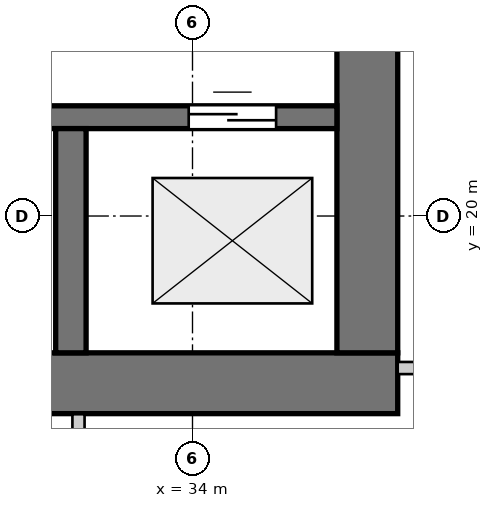
"""IFC4 building model, lengths in metres.
Left out: names, types, materials, properties, quantities, classifications, styles, units other than length and angle.
Written with IfcOpenShell. Run it as: python <this file> out.ifc"""

import sys

from ifc_helpers import new_model, si_unit, direction, frame, frame_2d, origin, place, context, subcontext, project, spatial, rectangle, extrude, source, transform, mapped, element, fill, save


model = new_model("IFC4")
c1 = context("Model", 3, precision=1e-05, world=origin(), true_north=direction((0.0, 1.0)))
c2 = subcontext(c1, "Body", "Model", "MODEL_VIEW")
j1 = project(units=[si_unit("LENGTHUNIT", "METRE"), si_unit("PLANEANGLEUNIT", "RADIAN")], contexts=[c1])
p1 = place(None, origin())
s1 = spatial("IfcSite", under=j1, at=p1, CompositionType="ELEMENT")
p2 = place(p1, origin())
s2 = spatial("IfcBuilding", under=s1, at=p2, CompositionType="ELEMENT")
p3 = place(p2, frame((0.0, 0.0, -8.7)))
s3 = spatial("IfcBuildingStorey", under=s2, at=p3, CompositionType="ELEMENT", Elevation=-8.7)
p4 = place(p3, frame((24.0, 17.8, 0.0), z_axis=(0.0, 0.0, 1.0), x_axis=(1.0, 0.0, 0.0)))
e1 = element("IfcWall", 1, at=p4, inside=s3, PredefinedType="SHEAR", context=c2, shape_type="SweptSolid", body=[
    extrude(rectangle(XDim=12.7, YDim=0.8, at=frame_2d((6.35, 0.0))), origin(), (0.0, 0.0, 1.0), 4.2),
])
p5 = place(p3, frame((36.3, 18.2, 0.0), z_axis=(0.0, 0.0, 1.0), x_axis=(0.0, 1.0, 0.0)))
e2 = element("IfcWall", 2, at=p5, inside=s3, PredefinedType="SHEAR", context=c2, shape_type="SweptSolid", body=[
    extrude(rectangle(XDim=15.6, YDim=0.8, at=frame_2d((7.8, 0.0))), origin(), (0.0, 0.0, 1.0), 4.2),
])
p6 = place(p5, frame((4.25, 0.0, 0.0)))
e3 = element("IfcOpeningElement", 3, at=p6, cuts=e2, PredefinedType="OPENING", context=c2, shape_type="SweptSolid", body=[
    extrude(rectangle(XDim=1.1, YDim=2.15, at=frame_2d((0.55, 1.075))), frame((0.0, 0.41, 0.0), z_axis=(0.0, -1.0, 0.0), x_axis=(1.0, 0.0, 0.0)), (0.0, 0.0, 1.0), 0.82),
])
p7 = place(p5, frame((10.25, 0.0, 0.0)))
e4 = element("IfcOpeningElement", 4, at=p7, cuts=e2, PredefinedType="OPENING", context=c2, shape_type="SweptSolid", body=[
    extrude(rectangle(XDim=1.1, YDim=2.15, at=frame_2d((0.55, 1.075))), frame((0.0, 0.41, 0.0), z_axis=(0.0, -1.0, 0.0), x_axis=(1.0, 0.0, 0.0)), (0.0, 0.0, 1.0), 0.82),
])
p8 = place(p3, frame((24.8, 21.3, 0.0), z_axis=(0.0, 0.0, 1.0), x_axis=(1.0, 0.0, 0.0)))
e5 = element("IfcWall", 5, at=p8, inside=s3, PredefinedType="SHEAR", context=c2, shape_type="SweptSolid", body=[
    extrude(rectangle(XDim=11.1, YDim=0.3, at=frame_2d((5.55, 0.0))), origin(), (0.0, 0.0, 1.0), 4.2),
])
p9 = place(p8, frame((6.22, 0.0, 0.0)))
e6 = element("IfcOpeningElement", 6, at=p9, cuts=e5, PredefinedType="OPENING", context=c2, shape_type="SweptSolid", body=[
    extrude(rectangle(XDim=0.98, YDim=2.15, at=frame_2d((0.49, 1.075))), frame((0.0, 0.16, 0.0), z_axis=(0.0, -1.0, 0.0), x_axis=(1.0, 0.0, 0.0)), (0.0, 0.0, 1.0), 0.32),
])
p10 = place(p8, frame((9.15, 0.0, 0.0)))
e7 = element("IfcOpeningElement", 7, at=p10, cuts=e5, PredefinedType="OPENING", context=c2, shape_type="SweptSolid", body=[
    extrude(rectangle(XDim=1.15, YDim=2.15, at=frame_2d((0.575, 1.075))), frame((0.0, 0.16, 0.0), z_axis=(0.0, -1.0, 0.0), x_axis=(1.0, 0.0, 0.0)), (0.0, 0.0, 1.0), 0.32),
])
p11 = place(p3, frame((32.4, 18.2, 0.0), z_axis=(0.0, 0.0, 1.0), x_axis=(0.0, 1.0, 0.0)))
e8 = element("IfcWall", 8, at=p11, inside=s3, PredefinedType="SHEAR", context=c2, shape_type="SweptSolid", body=[
    extrude(rectangle(XDim=2.95, YDim=0.4, at=frame_2d((1.475, 0.0))), origin(), (0.0, 0.0, 1.0), 4.2),
])
p12 = place(p3, frame((32.5, 15.588, 0.0), z_axis=(0.0, 0.0, 1.0), x_axis=(0.0, 1.0, 0.0)))
e9 = element("IfcWall", 9, at=p12, inside=s3, PredefinedType="PARTITIONING", context=c2, shape_type="SweptSolid", body=[
    extrude(rectangle(XDim=1.804, YDim=0.16, at=frame_2d((0.902, 0.0))), origin(), (0.0, 0.0, 1.0), 4.2),
])
p13 = place(p3, frame((36.7, 18.0, 0.0), z_axis=(0.0, 0.0, 1.0), x_axis=(1.0, 0.0, 0.0)))
e10 = element("IfcWall", 10, at=p13, inside=s3, PredefinedType="PARTITIONING", context=c2, shape_type="SweptSolid", body=[
    extrude(rectangle(XDim=9.7, YDim=0.16, at=frame_2d((4.85, 0.0))), origin(), (0.0, 0.0, 1.0), 4.2),
])
m1 = source(origin(), c2, "Body", "SweptSolid", [
    extrude(rectangle(XDim=1.15, YDim=2.15, at=frame_2d((0.575, 1.075))), frame((0.0, 0.025, 0.0), z_axis=(0.0, -1.0, 0.0), x_axis=(1.0, 0.0, 0.0)), (0.0, 0.0, 1.0), 0.05),
])
p14 = place(p10, origin())
e11 = element("IfcDoor", 11, at=p14, inside=s3, OperationType="DOUBLE_DOOR_SLIDING", PredefinedType="DOOR", context=c2, shape_type="MappedRepresentation", body=[
    mapped(m1, transform((0.0, 0.0, 0.0), x_axis=(1.0, 0.0, 0.0), y_axis=(0.0, 1.0, 0.0), z_axis=(0.0, 0.0, 1.0), scale=1.0)),
])
fill(e7, e11)
save(model, sys.argv[1])
